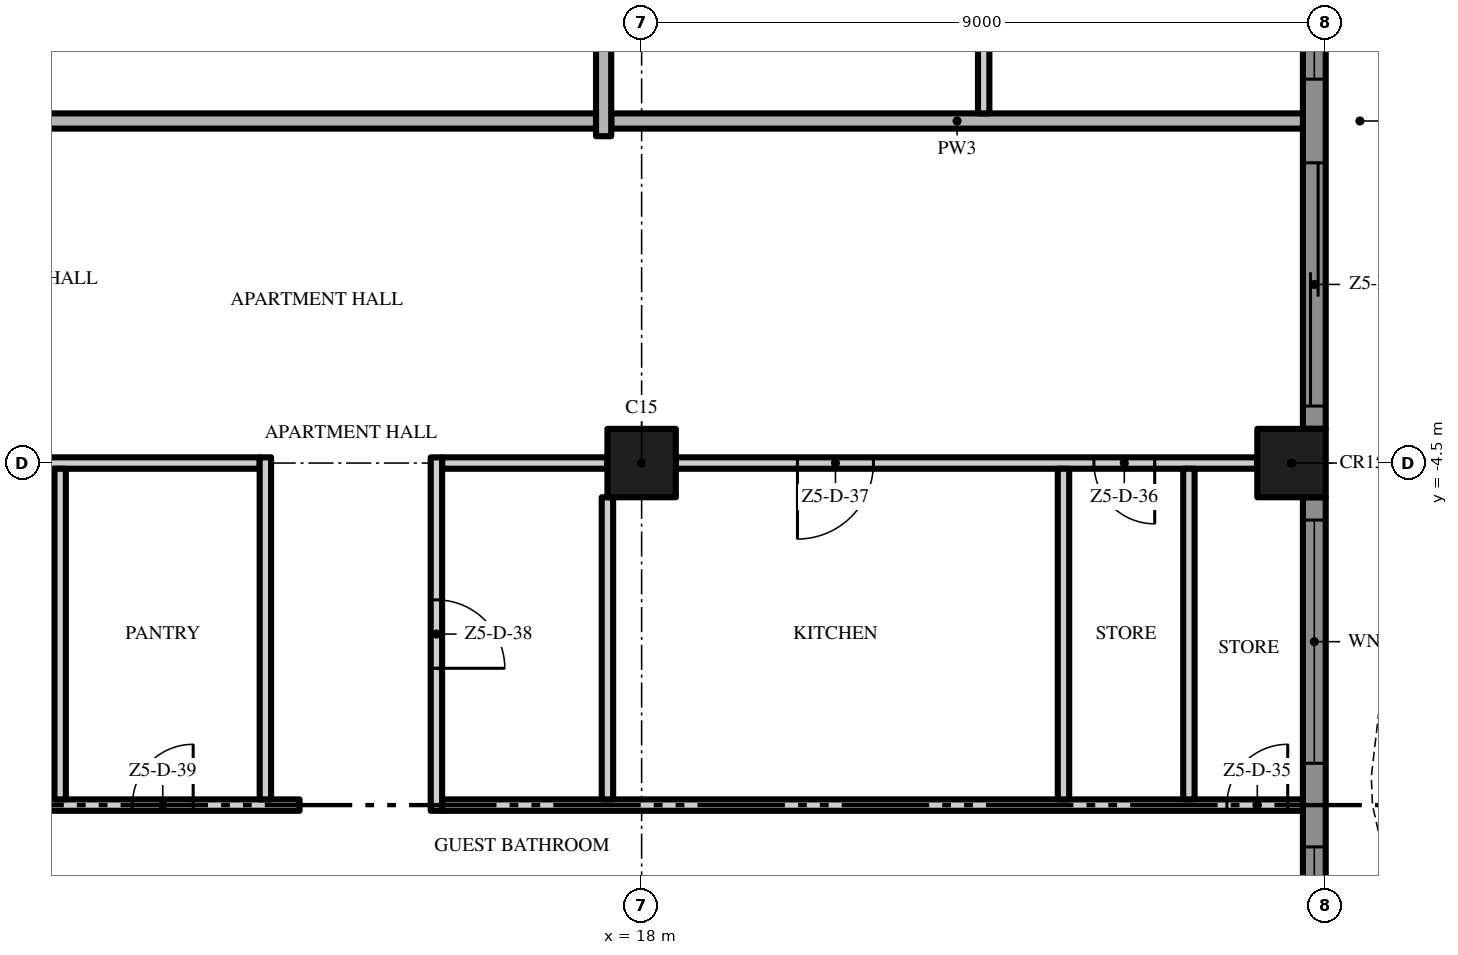
"""IFC4 building model, lengths in metres.
Left out: names, types, materials, properties, quantities, classifications, styles, units other than length and angle.
Written with IfcOpenShell. Run it as: python <this file> out.ifc"""

import sys

from ifc_helpers import new_model, si_unit, direction, frame, frame_2d, origin, origin_2d, place, context, subcontext, project, spatial, polyline, rectangle, outline, extrude, element, fill, save


model = new_model("IFC4")
c1 = context("Model", 3, precision=1e-05, world=origin(), true_north=direction((0.0, 1.0)))
c2 = subcontext(c1, "Body", "Model", "MODEL_VIEW")
j1 = project(units=[si_unit("LENGTHUNIT", "METRE"), si_unit("PLANEANGLEUNIT", "RADIAN")], contexts=[c1])
p1 = place(None, origin())
s1 = spatial("IfcSite", under=j1, at=p1, CompositionType="ELEMENT")
p2 = place(p1, origin())
s2 = spatial("IfcBuilding", under=s1, at=p2, CompositionType="ELEMENT")
p3 = place(p2, frame((0.0, 0.0, 276.8)))
s3 = spatial("IfcBuildingStorey", under=s2, at=p3, CompositionType="ELEMENT", Elevation=276.8)
for number, where, z_axis, x_axis in (
    (1, (18.0, -4.5, 0.0), (0.0, 0.0, 1.0), (1.0, 0.0, 0.0)),
    (2, (26.55, -4.5, 0.0), (0.0, 0.0, 1.0), (1.0, 0.0, 0.0)),
):
    element("IfcColumn", number, at=place(p3, frame(where, z_axis=z_axis, x_axis=x_axis)), inside=s3, PredefinedType="COLUMN", context=c2, shape_type="SweptSolid", body=[
        extrude(rectangle(XDim=0.9, YDim=0.9, at=origin_2d()), origin(), (0.0, 0.0, 1.0), 3.5),
    ])
p4 = place(p3, frame((26.85, -4.95, 0.0), z_axis=(0.0, 0.0, 1.0), x_axis=(0.0, -1.0, 0.0)))
e3 = element("IfcWall", 3, at=p4, inside=s3, PredefinedType="SOLIDWALL", context=c2, shape_type="SweptSolid", body=[
    extrude(rectangle(XDim=8.1, YDim=0.3, at=frame_2d((4.05, 0.0))), origin(), (0.0, 0.0, 1.0), 3.5),
])
p5 = place(p4, frame((4.6, 0.0, 0.45)))
e4 = element("IfcOpeningElement", 4, at=p5, cuts=e3, PredefinedType="OPENING", context=c2, shape_type="SweptSolid", body=[
    extrude(rectangle(XDim=3.2, YDim=2.65, at=frame_2d((1.6, 1.325))), frame((0.0, 0.16, 0.0), z_axis=(0.0, -1.0, 0.0), x_axis=(1.0, 0.0, 0.0)), (0.0, 0.0, 1.0), 0.32),
])
p6 = place(p4, frame((0.3, 0.0, 0.45)))
e5 = element("IfcOpeningElement", 5, at=p6, cuts=e3, PredefinedType="OPENING", context=c2, shape_type="SweptSolid", body=[
    extrude(rectangle(XDim=3.2, YDim=2.65, at=frame_2d((1.6, 1.325))), frame((0.0, 0.16, 0.0), z_axis=(0.0, -1.0, 0.0), x_axis=(1.0, 0.0, 0.0)), (0.0, 0.0, 1.0), 0.32),
])
p7 = place(p3, frame((26.85, 4.05, 0.0), z_axis=(0.0, 0.0, 1.0), x_axis=(0.0, -1.0, 0.0)))
e6 = element("IfcWall", 6, at=p7, inside=s3, PredefinedType="SOLIDWALL", context=c2, shape_type="SweptSolid", body=[
    extrude(rectangle(XDim=8.1, YDim=0.3, at=frame_2d((4.05, 0.0))), origin(), (0.0, 0.0, 1.0), 3.5),
])
p8 = place(p7, frame((4.6, 0.0, 0.0)))
e7 = element("IfcOpeningElement", 7, at=p8, cuts=e6, PredefinedType="OPENING", context=c2, shape_type="SweptSolid", body=[
    extrude(rectangle(XDim=3.2, YDim=2.4, at=frame_2d((1.6, 1.2))), frame((0.0, 0.16, 0.0), z_axis=(0.0, -1.0, 0.0), x_axis=(1.0, 0.0, 0.0)), (0.0, 0.0, 1.0), 0.32),
])
p9 = place(p7, frame((0.3, 0.0, 0.45)))
e8 = element("IfcOpeningElement", 8, at=p9, cuts=e6, PredefinedType="OPENING", context=c2, shape_type="SweptSolid", body=[
    extrude(rectangle(XDim=3.2, YDim=2.65, at=frame_2d((1.6, 1.325))), frame((0.0, 0.16, 0.0), z_axis=(0.0, -1.0, 0.0), x_axis=(1.0, 0.0, 0.0)), (0.0, 0.0, 1.0), 0.32),
])
p10 = place(p3, origin())
e9 = element("IfcWall", 9, at=p10, inside=s3, PredefinedType="USERDEFINED", context=c2, shape_type="SweptSolid", body=[
    extrude(outline(polyline([(29.649, -18.0), (29.985, -16.5), (30.0, -16.125), (29.869, -15.0), (29.345, -13.5), (28.612, -12.0), (27.951, -10.5), (27.615, -9.0), (27.6, -8.625), (27.731, -7.5), (28.255, -6.0), (28.988, -4.5), (29.649, -3.0), (29.985, -1.5), (30.0, -1.125), (29.869, 0.0), (29.345, 1.5), (28.612, 3.0), (27.951, 4.5), (27.615, 6.0), (27.6, 6.375), (27.731, 7.5), (28.255, 9.0), (28.988, 10.5), (29.649, 12.0), (29.985, 13.5), (30.0, 13.875), (29.869, 15.0), (29.345, 16.5), (28.612, 18.0), (28.388, 17.89), (29.114, 16.404), (29.624, 14.944), (29.749, 13.865), (29.736, 13.533), (29.41, 12.079), (28.761, 10.605), (28.024, 9.096), (27.486, 7.556), (27.349, 6.385), (27.366, 5.967), (27.713, 4.421), (28.385, 2.895), (29.114, 1.404), (29.624, -0.056), (29.749, -1.135), (29.736, -1.467), (29.41, -2.921), (28.761, -4.395), (28.024, -5.904), (27.486, -7.444), (27.349, -8.615), (27.366, -9.033), (27.713, -10.579), (28.385, -12.105), (29.114, -13.596), (29.624, -15.056), (29.749, -16.135), (29.736, -16.467), (29.405, -17.945), (29.649, -18.0)])), origin(), (0.0, 0.0, 1.0), 0.9),
])
p11 = place(p3, frame((0.1, -9.0, 0.0), z_axis=(0.0, 0.0, 1.0), x_axis=(1.0, 0.0, 0.0)))
e10 = element("IfcWall", 10, at=p11, inside=s3, PredefinedType="PARTITIONING", context=c2, shape_type="SweptSolid", body=[
    extrude(rectangle(XDim=13.4, YDim=0.15, at=frame_2d((6.7, 0.0))), origin(), (0.0, 0.0, 1.0), 3.5),
])
p12 = place(p11, frame((11.2, 0.0, 0.0)))
e11 = element("IfcOpeningElement", 11, at=p12, cuts=e10, PredefinedType="OPENING", context=c2, shape_type="SweptSolid", body=[
    extrude(rectangle(XDim=0.8, YDim=2.0, at=frame_2d((0.4, 1.0))), frame((0.0, 0.085, 0.0), z_axis=(0.0, -1.0, 0.0), x_axis=(1.0, 0.0, 0.0)), (0.0, 0.0, 1.0), 0.17),
])
p13 = place(p11, frame((8.55, 0.0, 0.0)))
e12 = element("IfcOpeningElement", 12, at=p13, cuts=e10, PredefinedType="OPENING", context=c2, shape_type="SweptSolid", body=[
    extrude(rectangle(XDim=0.8, YDim=2.0, at=frame_2d((0.4, 1.0))), frame((0.0, 0.085, 0.0), z_axis=(0.0, -1.0, 0.0), x_axis=(1.0, 0.0, 0.0)), (0.0, 0.0, 1.0), 0.17),
])
p14 = place(p11, frame((5.8, 0.0, 0.0)))
e13 = element("IfcOpeningElement", 13, at=p14, cuts=e10, PredefinedType="OPENING", context=c2, shape_type="SweptSolid", body=[
    extrude(rectangle(XDim=0.8, YDim=2.0, at=frame_2d((0.4, 1.0))), frame((0.0, 0.085, 0.0), z_axis=(0.0, -1.0, 0.0), x_axis=(1.0, 0.0, 0.0)), (0.0, 0.0, 1.0), 0.17),
])
p15 = place(p3, frame((15.375, -9.0, 0.0), z_axis=(0.0, 0.0, 1.0), x_axis=(1.0, 0.0, 0.0)))
e14 = element("IfcWall", 14, at=p15, inside=s3, PredefinedType="PARTITIONING", context=c2, shape_type="SweptSolid", body=[
    extrude(rectangle(XDim=11.325, YDim=0.15, at=frame_2d((5.662, 0.0))), origin(), (0.0, 0.0, 1.0), 3.5),
])
p16 = place(p15, frame((10.325, 0.0, 0.0)))
e15 = element("IfcOpeningElement", 15, at=p16, cuts=e14, PredefinedType="OPENING", context=c2, shape_type="SweptSolid", body=[
    extrude(rectangle(XDim=0.8, YDim=2.0, at=frame_2d((0.4, 1.0))), frame((0.0, 0.085, 0.0), z_axis=(0.0, -1.0, 0.0), x_axis=(1.0, 0.0, 0.0)), (0.0, 0.0, 1.0), 0.17),
])
p17 = place(p3, frame((9.45, -4.5, 0.0), z_axis=(0.0, 0.0, 1.0), x_axis=(1.0, 0.0, 0.0)))
e16 = element("IfcWall", 16, at=p17, inside=s3, PredefinedType="PARTITIONING", context=c2, shape_type="SweptSolid", body=[
    extrude(rectangle(XDim=3.525, YDim=0.15, at=frame_2d((1.762, 0.0))), origin(), (0.0, 0.0, 1.0), 3.5),
])
p18 = place(p3, frame((15.375, -4.5, 0.0), z_axis=(0.0, 0.0, 1.0), x_axis=(1.0, 0.0, 0.0)))
e17 = element("IfcWall", 17, at=p18, inside=s3, PredefinedType="PARTITIONING", context=c2, shape_type="SweptSolid", body=[
    extrude(rectangle(XDim=2.175, YDim=0.15, at=frame_2d((1.087, 0.0))), origin(), (0.0, 0.0, 1.0), 3.5),
])
p19 = place(p3, frame((26.1, -4.5, 0.0), z_axis=(0.0, 0.0, 1.0), x_axis=(-1.0, 0.0, 0.0)))
e18 = element("IfcWall", 18, at=p19, inside=s3, PredefinedType="PARTITIONING", context=c2, shape_type="SweptSolid", body=[
    extrude(rectangle(XDim=7.65, YDim=0.15, at=frame_2d((3.825, 0.0))), origin(), (0.0, 0.0, 1.0), 3.5),
])
p20 = place(p19, frame((1.35, 0.0, 0.0)))
e19 = element("IfcOpeningElement", 19, at=p20, cuts=e18, PredefinedType="OPENING", context=c2, shape_type="SweptSolid", body=[
    extrude(rectangle(XDim=0.8, YDim=2.0, at=frame_2d((0.4, 1.0))), frame((0.0, 0.085, 0.0), z_axis=(0.0, -1.0, 0.0), x_axis=(1.0, 0.0, 0.0)), (0.0, 0.0, 1.0), 0.17),
])
p21 = place(p19, frame((5.05, 0.0, 0.0)))
e20 = element("IfcOpeningElement", 20, at=p21, cuts=e18, PredefinedType="OPENING", context=c2, shape_type="SweptSolid", body=[
    extrude(rectangle(XDim=1.0, YDim=2.4, at=frame_2d((0.5, 1.2))), frame((0.0, 0.085, 0.0), z_axis=(0.0, -1.0, 0.0), x_axis=(1.0, 0.0, 0.0)), (0.0, 0.0, 1.0), 0.17),
])
p22 = place(p3, frame((17.4, 0.0, 0.0), z_axis=(0.0, 0.0, 1.0), x_axis=(-1.0, 0.0, 0.0)))
e21 = element("IfcWall", 21, at=p22, inside=s3, PredefinedType="PARTITIONING", context=c2, shape_type="SweptSolid", body=[
    extrude(rectangle(XDim=34.8, YDim=0.2, at=frame_2d((17.4, 0.0))), origin(), (0.0, 0.0, 1.0), 3.5),
])
p23 = place(p22, frame((25.65, 0.0, 0.0)))
e22 = element("IfcOpeningElement", 22, at=p23, cuts=e21, PredefinedType="OPENING", context=c2, shape_type="SweptSolid", body=[
    extrude(rectangle(XDim=1.5, YDim=2.4, at=frame_2d((0.75, 1.2))), frame((0.0, 0.11, 0.0), z_axis=(0.0, -1.0, 0.0), x_axis=(1.0, 0.0, 0.0)), (0.0, 0.0, 1.0), 0.22),
])
p24 = place(p22, frame((7.65, 0.0, 0.0)))
e23 = element("IfcOpeningElement", 23, at=p24, cuts=e21, PredefinedType="OPENING", context=c2, shape_type="SweptSolid", body=[
    extrude(rectangle(XDim=1.5, YDim=2.4, at=frame_2d((0.75, 1.2))), frame((0.0, 0.11, 0.0), z_axis=(0.0, -1.0, 0.0), x_axis=(1.0, 0.0, 0.0)), (0.0, 0.0, 1.0), 0.22),
])
p25 = place(p3, frame((17.6, 0.0, 0.0), z_axis=(0.0, 0.0, 1.0), x_axis=(1.0, 0.0, 0.0)))
e24 = element("IfcWall", 24, at=p25, inside=s3, PredefinedType="PARTITIONING", context=c2, shape_type="SweptSolid", body=[
    extrude(rectangle(XDim=9.1, YDim=0.2, at=frame_2d((4.55, 0.0))), origin(), (0.0, 0.0, 1.0), 3.5),
])
p26 = place(p3, frame((10.35, -8.925, 0.0), z_axis=(0.0, 0.0, 1.0), x_axis=(0.0, 1.0, 0.0)))
e25 = element("IfcWall", 25, at=p26, inside=s3, PredefinedType="PARTITIONING", context=c2, shape_type="SweptSolid", body=[
    extrude(rectangle(XDim=4.35, YDim=0.15, at=frame_2d((2.175, 0.0))), origin(), (0.0, 0.0, 1.0), 3.5),
])
p27 = place(p3, frame((13.05, -8.925, 0.0), z_axis=(0.0, 0.0, 1.0), x_axis=(0.0, 1.0, 0.0)))
e26 = element("IfcWall", 26, at=p27, inside=s3, PredefinedType="PARTITIONING", context=c2, shape_type="SweptSolid", body=[
    extrude(rectangle(XDim=4.5, YDim=0.15, at=frame_2d((2.25, 0.0))), origin(), (0.0, 0.0, 1.0), 3.5),
])
p28 = place(p3, frame((15.3, -4.425, 0.0), z_axis=(0.0, 0.0, 1.0), x_axis=(0.0, -1.0, 0.0)))
e27 = element("IfcWall", 27, at=p28, inside=s3, PredefinedType="PARTITIONING", context=c2, shape_type="SweptSolid", body=[
    extrude(rectangle(XDim=4.65, YDim=0.15, at=frame_2d((2.325, 0.0))), origin(), (0.0, 0.0, 1.0), 3.5),
])
p29 = place(p28, frame((1.875, 0.0, 0.0)))
e28 = element("IfcOpeningElement", 28, at=p29, cuts=e27, PredefinedType="OPENING", context=c2, shape_type="SweptSolid", body=[
    extrude(rectangle(XDim=0.9, YDim=2.1, at=frame_2d((0.45, 1.05))), frame((0.0, 0.085, 0.0), z_axis=(0.0, -1.0, 0.0), x_axis=(1.0, 0.0, 0.0)), (0.0, 0.0, 1.0), 0.17),
])
p30 = place(p3, frame((17.5, -0.2, 0.0), z_axis=(0.0, 0.0, 1.0), x_axis=(0.0, 1.0, 0.0)))
e29 = element("IfcWall", 29, at=p30, inside=s3, PredefinedType="PARTITIONING", context=c2, shape_type="SweptSolid", body=[
    extrude(rectangle(XDim=4.25, YDim=0.2, at=frame_2d((2.125, 0.0))), origin(), (0.0, 0.0, 1.0), 3.5),
])
p31 = place(p3, frame((17.55, -8.925, 0.0), z_axis=(0.0, 0.0, 1.0), x_axis=(0.0, 1.0, 0.0)))
e30 = element("IfcWall", 30, at=p31, inside=s3, PredefinedType="PARTITIONING", context=c2, shape_type="SweptSolid", body=[
    extrude(rectangle(XDim=3.975, YDim=0.15, at=frame_2d((1.988, 0.0))), origin(), (0.0, 0.0, 1.0), 3.5),
])
p32 = place(p3, frame((22.5, 17.55, 0.0), z_axis=(0.0, 0.0, 1.0), x_axis=(0.0, -1.0, 0.0)))
e31 = element("IfcWall", 31, at=p32, inside=s3, PredefinedType="PARTITIONING", context=c2, shape_type="SweptSolid", body=[
    extrude(rectangle(XDim=17.45, YDim=0.15, at=frame_2d((8.725, 0.0))), origin(), (0.0, 0.0, 1.0), 3.5),
])
p33 = place(p32, frame((14.8, 0.0, 0.0)))
e32 = element("IfcOpeningElement", 32, at=p33, cuts=e31, PredefinedType="OPENING", context=c2, shape_type="SweptSolid", body=[
    extrude(rectangle(XDim=1.0, YDim=2.4, at=frame_2d((0.5, 1.2))), frame((0.0, 0.085, 0.0), z_axis=(0.0, -1.0, 0.0), x_axis=(1.0, 0.0, 0.0)), (0.0, 0.0, 1.0), 0.17),
])
p34 = place(p32, frame((7.65, 0.0, 0.0)))
e33 = element("IfcOpeningElement", 33, at=p34, cuts=e31, PredefinedType="OPENING", context=c2, shape_type="SweptSolid", body=[
    extrude(rectangle(XDim=1.8, YDim=2.4, at=frame_2d((0.9, 1.2))), frame((0.0, 0.085, 0.0), z_axis=(0.0, -1.0, 0.0), x_axis=(1.0, 0.0, 0.0)), (0.0, 0.0, 1.0), 0.17),
])
for number, where, z_axis, x_axis in (
    (34, (23.55, -8.925, 0.0), (0.0, 0.0, 1.0), (0.0, 1.0, 0.0)),
    (35, (25.2, -8.925, 0.0), (0.0, 0.0, 1.0), (0.0, 1.0, 0.0)),
):
    element("IfcWall", number, at=place(p3, frame(where, z_axis=z_axis, x_axis=x_axis)), inside=s3, PredefinedType="PARTITIONING", context=c2, shape_type="SweptSolid", body=[
        extrude(rectangle(XDim=4.35, YDim=0.15, at=frame_2d((2.175, 0.0))), origin(), (0.0, 0.0, 1.0), 3.5),
    ])
p35 = place(p5, origin())
e36 = element("IfcWindow", 36, at=p35, inside=s3, PartitioningType="SINGLE_PANEL", PredefinedType="WINDOW", context=c2, shape_type="SweptSolid", body=[
    extrude(rectangle(XDim=3.2, YDim=2.65, at=frame_2d((1.6, 1.325))), frame((0.0, 0.03, 0.0), z_axis=(0.0, -1.0, 0.0), x_axis=(1.0, 0.0, 0.0)), (0.0, 0.0, 1.0), 0.06),
])
fill(e4, e36)
p36 = place(p6, origin())
e37 = element("IfcWindow", 37, at=p36, inside=s3, PartitioningType="SINGLE_PANEL", PredefinedType="WINDOW", context=c2, shape_type="SweptSolid", body=[
    extrude(rectangle(XDim=3.2, YDim=2.65, at=frame_2d((1.6, 1.325))), frame((0.0, 0.03, 0.0), z_axis=(0.0, -1.0, 0.0), x_axis=(1.0, 0.0, 0.0)), (0.0, 0.0, 1.0), 0.06),
])
fill(e5, e37)
p37 = place(p8, origin())
e38 = element("IfcDoor", 38, at=p37, inside=s3, OperationType="SINGLE_SWING_LEFT", PredefinedType="DOOR", context=c2, shape_type="SweptSolid", body=[
    extrude(rectangle(XDim=3.2, YDim=2.4, at=frame_2d((1.6, 1.2))), frame((0.0, 0.025, 0.0), z_axis=(0.0, -1.0, 0.0), x_axis=(1.0, 0.0, 0.0)), (0.0, 0.0, 1.0), 0.05),
])
fill(e7, e38)
p38 = place(p9, origin())
e39 = element("IfcWindow", 39, at=p38, inside=s3, PartitioningType="SINGLE_PANEL", PredefinedType="WINDOW", context=c2, shape_type="SweptSolid", body=[
    extrude(rectangle(XDim=3.2, YDim=2.65, at=frame_2d((1.6, 1.325))), frame((0.0, 0.03, 0.0), z_axis=(0.0, -1.0, 0.0), x_axis=(1.0, 0.0, 0.0)), (0.0, 0.0, 1.0), 0.06),
])
fill(e8, e39)
p39 = place(p16, origin())
e40 = element("IfcDoor", 40, at=p39, inside=s3, OperationType="SINGLE_SWING_RIGHT", PredefinedType="DOOR", context=c2, shape_type="SweptSolid", body=[
    extrude(rectangle(XDim=0.8, YDim=2.0, at=frame_2d((0.4, 1.0))), frame((0.0, 0.025, 0.0), z_axis=(0.0, -1.0, 0.0), x_axis=(1.0, 0.0, 0.0)), (0.0, 0.0, 1.0), 0.05),
])
fill(e15, e40)
p40 = place(p20, origin())
e41 = element("IfcDoor", 41, at=p40, inside=s3, OperationType="SINGLE_SWING_LEFT", PredefinedType="DOOR", context=c2, shape_type="SweptSolid", body=[
    extrude(rectangle(XDim=0.8, YDim=2.0, at=frame_2d((0.4, 1.0))), frame((0.0, 0.025, 0.0), z_axis=(0.0, -1.0, 0.0), x_axis=(1.0, 0.0, 0.0)), (0.0, 0.0, 1.0), 0.05),
])
fill(e19, e41)
p41 = place(p21, origin())
e42 = element("IfcDoor", 42, at=p41, inside=s3, OperationType="SINGLE_SWING_RIGHT", PredefinedType="DOOR", context=c2, shape_type="SweptSolid", body=[
    extrude(rectangle(XDim=1.0, YDim=2.4, at=frame_2d((0.5, 1.2))), frame((0.0, 0.025, 0.0), z_axis=(0.0, -1.0, 0.0), x_axis=(1.0, 0.0, 0.0)), (0.0, 0.0, 1.0), 0.05),
])
fill(e20, e42)
p42 = place(p29, origin())
e43 = element("IfcDoor", 43, at=p42, inside=s3, OperationType="SINGLE_SWING_RIGHT", PredefinedType="DOOR", context=c2, shape_type="SweptSolid", body=[
    extrude(rectangle(XDim=0.9, YDim=2.1, at=frame_2d((0.45, 1.05))), frame((0.0, 0.025, 0.0), z_axis=(0.0, -1.0, 0.0), x_axis=(1.0, 0.0, 0.0)), (0.0, 0.0, 1.0), 0.05),
])
fill(e28, e43)
p43 = place(p12, origin())
e44 = element("IfcDoor", 44, at=p43, inside=s3, OperationType="SINGLE_SWING_RIGHT", PredefinedType="DOOR", context=c2, shape_type="SweptSolid", body=[
    extrude(rectangle(XDim=0.8, YDim=2.0, at=frame_2d((0.4, 1.0))), frame((0.0, 0.025, 0.0), z_axis=(0.0, -1.0, 0.0), x_axis=(1.0, 0.0, 0.0)), (0.0, 0.0, 1.0), 0.05),
])
fill(e11, e44)
save(model, sys.argv[1])
